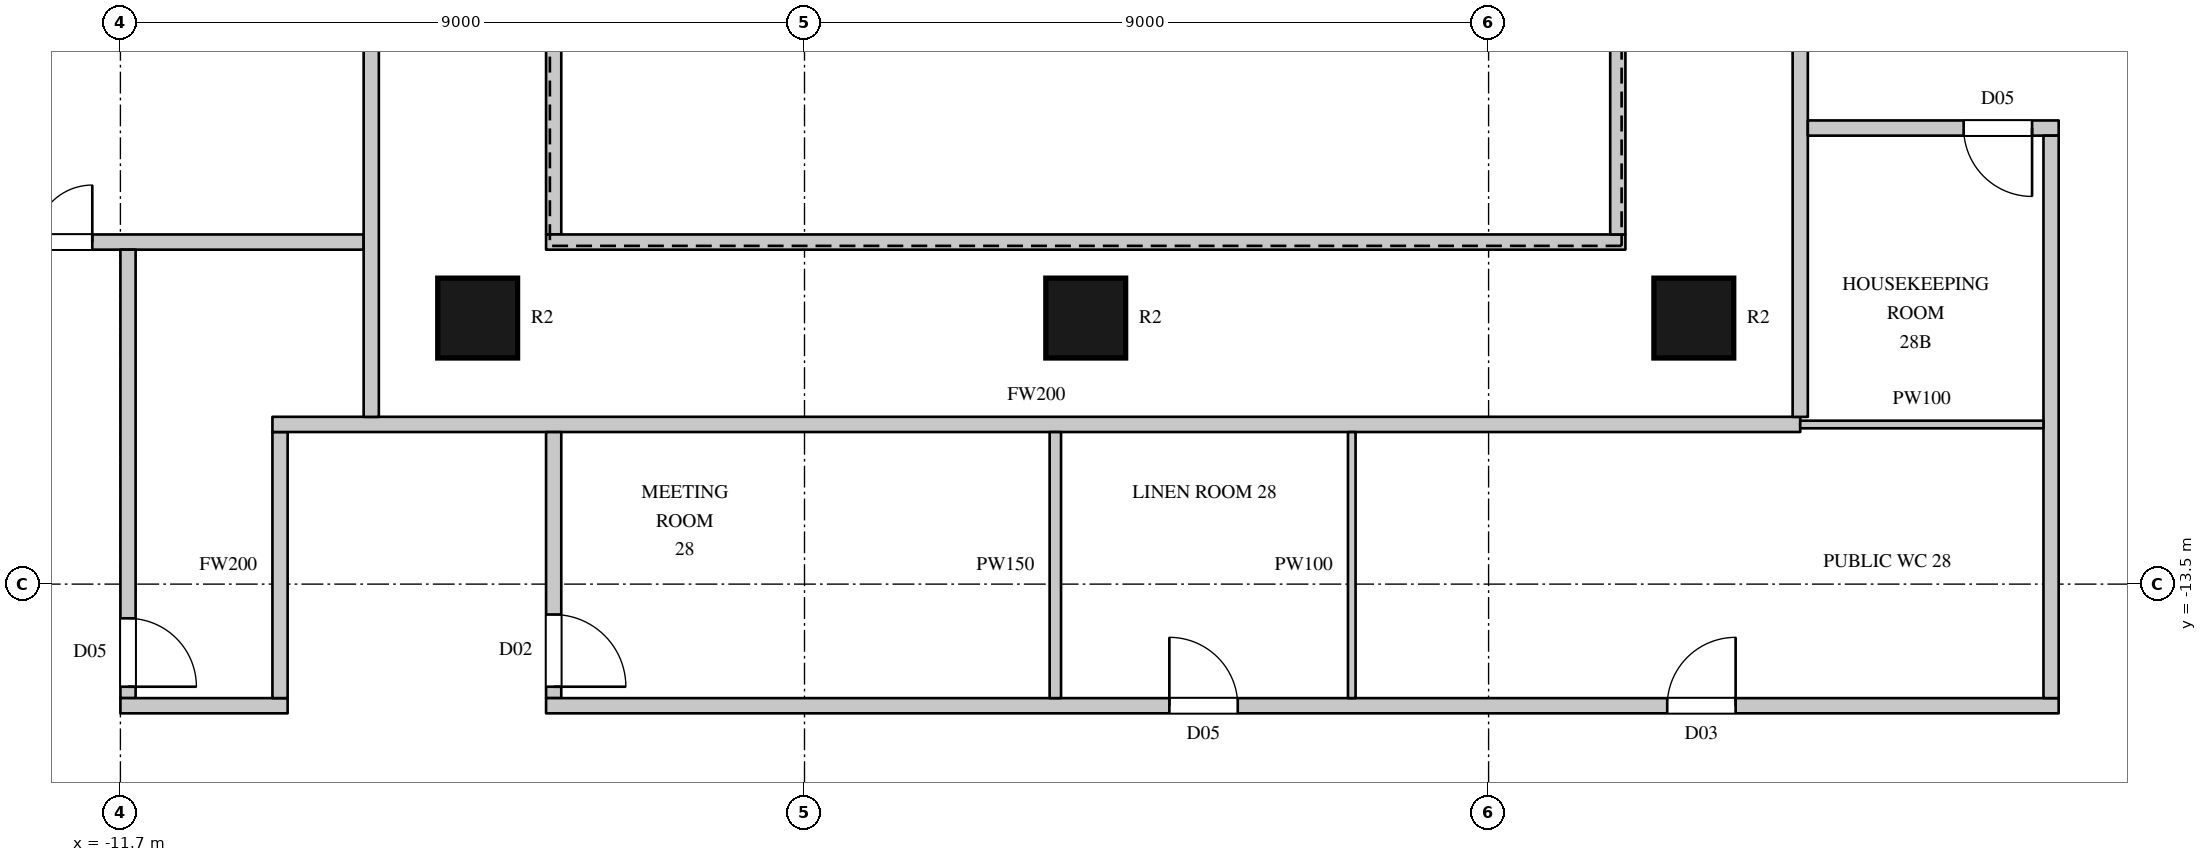
"""IFC4 building model, lengths in metres.
Left out: names, types, materials, properties, quantities, classifications, styles, units other than length and angle.
Written with IfcOpenShell. Run it as: python <this file> out.ifc"""

import sys

from ifc_helpers import new_model, si_unit, direction, frame, frame_2d, origin, origin_2d, place, context, subcontext, project, spatial, rectangle, circle, extrude, element, fill, save


model = new_model("IFC4")
c1 = context("Model", 3, precision=1e-05, world=origin(), true_north=direction((0.0, 1.0)))
c2 = subcontext(c1, "Body", "Model", "MODEL_VIEW")
j1 = project(units=[si_unit("LENGTHUNIT", "METRE"), si_unit("PLANEANGLEUNIT", "RADIAN")], contexts=[c1])
p1 = place(None, origin())
s1 = spatial("IfcSite", under=j1, at=p1, CompositionType="ELEMENT")
p2 = place(p1, origin())
s2 = spatial("IfcBuilding", under=s1, at=p2, CompositionType="ELEMENT")
p3 = place(p2, frame((0.0, 0.0, 131.1)))
s3 = spatial("IfcBuildingStorey", under=s2, at=p3, CompositionType="ELEMENT", Elevation=131.1)
for number, where, z_axis, x_axis in (
    (1, (-7.0, -10.0, 0.0), (0.0, 0.0, 1.0), (1.0, 0.0, 0.0)),
    (2, (1.0, -10.0, 0.0), (0.0, 0.0, 1.0), (1.0, 0.0, 0.0)),
    (3, (9.0, -10.0, 0.0), (0.0, 0.0, 1.0), (1.0, 0.0, 0.0)),
):
    element("IfcColumn", number, at=place(p3, frame(where, z_axis=z_axis, x_axis=x_axis)), inside=s3, PredefinedType="COLUMN", context=c2, shape_type="SweptSolid", body=[
        extrude(circle(Radius=0.525, at=origin_2d()), origin(), (0.0, 0.0, 1.0), 3.6),
    ])
p4 = place(p3, frame((-13.97, -9.0, 0.0), z_axis=(0.0, 0.0, 1.0), x_axis=(1.0, 0.0, 0.0)))
e4 = element("IfcWall", 4, at=p4, inside=s3, PredefinedType="PARTITIONING", context=c2, shape_type="SweptSolid", body=[
    extrude(rectangle(XDim=5.47, YDim=0.2, at=frame_2d((2.735, 0.0))), origin(), (0.0, 0.0, 1.0), 3.3),
])
p5 = place(p4, frame((0.4, 0.0, 0.0)))
e5 = element("IfcOpeningElement", 5, at=p5, cuts=e4, PredefinedType="OPENING", context=c2, shape_type="SweptSolid", body=[
    extrude(rectangle(XDim=1.5, YDim=2.2, at=frame_2d((0.75, 1.1))), frame((0.0, 0.11, 0.0), z_axis=(0.0, -1.0, 0.0), x_axis=(1.0, 0.0, 0.0)), (0.0, 0.0, 1.0), 0.22),
])
p6 = place(p3, frame((-11.6, -15.0, 0.0), z_axis=(0.0, 0.0, 1.0), x_axis=(0.0, 1.0, 0.0)))
e6 = element("IfcWall", 6, at=p6, inside=s3, PredefinedType="PARTITIONING", context=c2, shape_type="SweptSolid", body=[
    extrude(rectangle(XDim=5.9, YDim=0.2, at=frame_2d((2.95, 0.0))), origin(), (0.0, 0.0, 1.0), 2.6),
])
p7 = place(p6, frame((0.15, 0.0, 0.0)))
e7 = element("IfcOpeningElement", 7, at=p7, cuts=e6, PredefinedType="OPENING", context=c2, shape_type="SweptSolid", body=[
    extrude(rectangle(XDim=0.9, YDim=2.2, at=frame_2d((0.45, 1.1))), frame((0.0, 0.11, 0.0), z_axis=(0.0, -1.0, 0.0), x_axis=(1.0, 0.0, 0.0)), (0.0, 0.0, 1.0), 0.22),
])
p8 = place(p3, frame((-11.7, -15.1, 0.0), z_axis=(0.0, 0.0, 1.0), x_axis=(1.0, 0.0, 0.0)))
e8 = element("IfcWall", 8, at=p8, inside=s3, PredefinedType="PARTITIONING", context=c2, shape_type="SweptSolid", body=[
    extrude(rectangle(XDim=2.2, YDim=0.2, at=frame_2d((1.1, 0.0))), origin(), (0.0, 0.0, 1.0), 3.3),
])
p9 = place(p3, frame((-9.6, -15.0, 0.0), z_axis=(0.0, 0.0, 1.0), x_axis=(0.0, 1.0, 0.0)))
e9 = element("IfcWall", 9, at=p9, inside=s3, PredefinedType="PARTITIONING", context=c2, shape_type="SweptSolid", body=[
    extrude(rectangle(XDim=3.501, YDim=0.2, at=frame_2d((1.75, 0.0))), origin(), (0.0, 0.0, 1.0), 3.3),
])
p10 = place(p3, frame((-9.7, -11.399, 0.0), z_axis=(0.0, 0.0, 1.0), x_axis=(1.0, 0.0, 0.0)))
e10 = element("IfcWall", 10, at=p10, inside=s3, PredefinedType="PARTITIONING", context=c2, shape_type="SweptSolid", body=[
    extrude(rectangle(XDim=20.1, YDim=0.2, at=frame_2d((10.05, 0.0))), origin(), (0.0, 0.0, 1.0), 3.3),
])
p11 = place(p3, frame((-8.4, -11.3, 0.0), z_axis=(0.0, 0.0, 1.0), x_axis=(0.0, 1.0, 0.0)))
e11 = element("IfcWall", 11, at=p11, inside=s3, PredefinedType="PARTITIONING", context=c2, shape_type="SweptSolid", body=[
    extrude(rectangle(XDim=22.7, YDim=0.2, at=frame_2d((11.35, 0.0))), origin(), (0.0, 0.0, 1.0), 3.3),
])
p12 = place(p11, frame((15.05, 0.0, 0.0)))
e12 = element("IfcOpeningElement", 12, at=p12, cuts=e11, PredefinedType="OPENING", context=c2, shape_type="SweptSolid", body=[
    extrude(rectangle(XDim=1.5, YDim=2.2, at=frame_2d((0.75, 1.1))), frame((0.0, 0.11, 0.0), z_axis=(0.0, -1.0, 0.0), x_axis=(1.0, 0.0, 0.0)), (0.0, 0.0, 1.0), 0.22),
])
p13 = place(p3, frame((-6.0, -15.0, 0.0), z_axis=(0.0, 0.0, 1.0), x_axis=(0.0, 1.0, 0.0)))
e13 = element("IfcWall", 13, at=p13, inside=s3, PredefinedType="PARTITIONING", context=c2, shape_type="SweptSolid", body=[
    extrude(rectangle(XDim=3.5, YDim=0.2, at=frame_2d((1.75, 0.0))), origin(), (0.0, 0.0, 1.0), 3.3),
])
p14 = place(p13, frame((0.15, 0.0, 0.0)))
e14 = element("IfcOpeningElement", 14, at=p14, cuts=e13, PredefinedType="OPENING", context=c2, shape_type="SweptSolid", body=[
    extrude(rectangle(XDim=0.95, YDim=2.2, at=frame_2d((0.475, 1.1))), frame((0.0, 0.11, 0.0), z_axis=(0.0, -1.0, 0.0), x_axis=(1.0, 0.0, 0.0)), (0.0, 0.0, 1.0), 0.22),
])
p15 = place(p3, frame((-6.1, -15.1, 0.0), z_axis=(0.0, 0.0, 1.0), x_axis=(1.0, 0.0, 0.0)))
e15 = element("IfcWall", 15, at=p15, inside=s3, PredefinedType="PARTITIONING", context=c2, shape_type="SweptSolid", body=[
    extrude(rectangle(XDim=19.9, YDim=0.2, at=frame_2d((9.95, 0.0))), origin(), (0.0, 0.0, 1.0), 3.3),
])
p16 = place(p15, frame((8.2, 0.0, 0.0)))
e16 = element("IfcOpeningElement", 16, at=p16, cuts=e15, PredefinedType="OPENING", context=c2, shape_type="SweptSolid", body=[
    extrude(rectangle(XDim=0.9, YDim=2.2, at=frame_2d((0.45, 1.1))), frame((0.0, 0.11, 0.0), z_axis=(0.0, -1.0, 0.0), x_axis=(1.0, 0.0, 0.0)), (0.0, 0.0, 1.0), 0.22),
])
p17 = place(p15, frame((14.75, 0.0, 0.0)))
e17 = element("IfcOpeningElement", 17, at=p17, cuts=e15, PredefinedType="OPENING", context=c2, shape_type="SweptSolid", body=[
    extrude(rectangle(XDim=0.9, YDim=2.2, at=frame_2d((0.45, 1.1))), frame((0.0, 0.11, 0.0), z_axis=(0.0, -1.0, 0.0), x_axis=(1.0, 0.0, 0.0)), (0.0, 0.0, 1.0), 0.22),
])
p18 = place(p3, frame((-6.0, -8.9, 0.0), z_axis=(0.0, 0.0, 1.0), x_axis=(0.0, 1.0, 0.0)))
e18 = element("IfcWall", 18, at=p18, inside=s3, PredefinedType="PARTITIONING", context=c2, shape_type="SweptSolid", body=[
    extrude(rectangle(XDim=17.8, YDim=0.2, at=frame_2d((8.9, 0.0))), origin(), (0.0, 0.0, 1.0), 3.3),
])
p19 = place(p3, frame((-6.1, -9.0, 0.0), z_axis=(0.0, 0.0, 1.0), x_axis=(1.0, 0.0, 0.0)))
e19 = element("IfcWall", 19, at=p19, inside=s3, PredefinedType="PARTITIONING", context=c2, shape_type="SweptSolid", body=[
    extrude(rectangle(XDim=14.2, YDim=0.2, at=frame_2d((7.1, 0.0))), origin(), (0.0, 0.0, 1.0), 3.3),
])
p20 = place(p3, frame((8.0, -8.9, 0.0), z_axis=(0.0, 0.0, 1.0), x_axis=(0.0, 1.0, 0.0)))
e20 = element("IfcWall", 20, at=p20, inside=s3, PredefinedType="PARTITIONING", context=c2, shape_type="SweptSolid", body=[
    extrude(rectangle(XDim=17.8, YDim=0.2, at=frame_2d((8.9, 0.0))), origin(), (0.0, 0.0, 1.0), 3.3),
])
p21 = place(p3, frame((10.4, -11.3, 0.0), z_axis=(0.0, 0.0, 1.0), x_axis=(0.0, 1.0, 0.0)))
e21 = element("IfcWall", 21, at=p21, inside=s3, PredefinedType="PARTITIONING", context=c2, shape_type="SweptSolid", body=[
    extrude(rectangle(XDim=22.6, YDim=0.2, at=frame_2d((11.3, 0.0))), origin(), (0.0, 0.0, 1.0), 3.3),
])
p22 = place(p21, frame((16.3, 0.0, 0.0)))
e22 = element("IfcOpeningElement", 22, at=p22, cuts=e21, PredefinedType="OPENING", context=c2, shape_type="SweptSolid", body=[
    extrude(rectangle(XDim=1.5, YDim=2.2, at=frame_2d((0.75, 1.1))), frame((0.0, 0.11, 0.0), z_axis=(0.0, -1.0, 0.0), x_axis=(1.0, 0.0, 0.0)), (0.0, 0.0, 1.0), 0.22),
])
p23 = place(p21, frame((9.15, 0.0, 0.0)))
e23 = element("IfcOpeningElement", 23, at=p23, cuts=e21, PredefinedType="OPENING", context=c2, shape_type="SweptSolid", body=[
    extrude(rectangle(XDim=1.5, YDim=2.2, at=frame_2d((0.75, 1.1))), frame((0.0, 0.11, 0.0), z_axis=(0.0, -1.0, 0.0), x_axis=(1.0, 0.0, 0.0)), (0.0, 0.0, 1.0), 0.22),
])
p24 = place(p3, frame((10.5, -7.5, 0.0), z_axis=(0.0, 0.0, 1.0), x_axis=(1.0, 0.0, 0.0)))
e24 = element("IfcWall", 24, at=p24, inside=s3, PredefinedType="PARTITIONING", context=c2, shape_type="SweptSolid", body=[
    extrude(rectangle(XDim=3.3, YDim=0.2, at=frame_2d((1.65, 0.0))), origin(), (0.0, 0.0, 1.0), 3.3),
])
p25 = place(p24, frame((2.05, 0.0, 0.0)))
e25 = element("IfcOpeningElement", 25, at=p25, cuts=e24, PredefinedType="OPENING", context=c2, shape_type="SweptSolid", body=[
    extrude(rectangle(XDim=0.9, YDim=2.2, at=frame_2d((0.45, 1.1))), frame((0.0, 0.11, 0.0), z_axis=(0.0, -1.0, 0.0), x_axis=(1.0, 0.0, 0.0)), (0.0, 0.0, 1.0), 0.22),
])
p26 = place(p3, frame((13.7, -15.0, 0.0), z_axis=(0.0, 0.0, 1.0), x_axis=(0.0, 1.0, 0.0)))
e26 = element("IfcWall", 26, at=p26, inside=s3, PredefinedType="PARTITIONING", context=c2, shape_type="SweptSolid", body=[
    extrude(rectangle(XDim=7.4, YDim=0.2, at=frame_2d((3.7, 0.0))), origin(), (0.0, 0.0, 1.0), 3.3),
])
p27 = place(p3, frame((0.6, -15.0, 0.0), z_axis=(0.0, 0.0, 1.0), x_axis=(0.0, 1.0, 0.0)))
e27 = element("IfcWall", 27, at=p27, inside=s3, PredefinedType="PARTITIONING", context=c2, shape_type="SweptSolid", body=[
    extrude(rectangle(XDim=3.5, YDim=0.15, at=frame_2d((1.75, 0.0))), origin(), (0.0, 0.0, 1.0), 3.3),
])
p28 = place(p3, frame((4.5, -15.0, 0.0), z_axis=(0.0, 0.0, 1.0), x_axis=(0.0, 1.0, 0.0)))
e28 = element("IfcWall", 28, at=p28, inside=s3, PredefinedType="PARTITIONING", context=c2, shape_type="SweptSolid", body=[
    extrude(rectangle(XDim=3.5, YDim=0.1, at=frame_2d((1.75, 0.0))), origin(), (0.0, 0.0, 1.0), 3.3),
])
p29 = place(p3, frame((10.4, -11.4, 0.0), z_axis=(0.0, 0.0, 1.0), x_axis=(1.0, 0.0, 0.0)))
e29 = element("IfcWall", 29, at=p29, inside=s3, PredefinedType="PARTITIONING", context=c2, shape_type="SweptSolid", body=[
    extrude(rectangle(XDim=3.2, YDim=0.1, at=frame_2d((1.6, 0.0))), origin(), (0.0, 0.0, 1.0), 3.3),
])
p30 = place(p5, origin())
e30 = element("IfcDoor", 30, at=p30, inside=s3, OperationType="DOUBLE_DOOR_SINGLE_SWING", PredefinedType="DOOR", context=c2, shape_type="SweptSolid", body=[
    extrude(rectangle(XDim=1.5, YDim=2.2, at=frame_2d((0.75, 1.1))), frame((0.0, 0.025, 0.0), z_axis=(0.0, -1.0, 0.0), x_axis=(1.0, 0.0, 0.0)), (0.0, 0.0, 1.0), 0.05),
])
fill(e5, e30)
p31 = place(p7, origin())
e31 = element("IfcDoor", 31, at=p31, inside=s3, OperationType="SINGLE_SWING_RIGHT", PredefinedType="DOOR", context=c2, shape_type="SweptSolid", body=[
    extrude(rectangle(XDim=0.9, YDim=2.2, at=frame_2d((0.45, 1.1))), frame((0.0, 0.025, 0.0), z_axis=(0.0, -1.0, 0.0), x_axis=(1.0, 0.0, 0.0)), (0.0, 0.0, 1.0), 0.05),
])
fill(e7, e31)
p32 = place(p14, origin())
e32 = element("IfcDoor", 32, at=p32, inside=s3, OperationType="SINGLE_SWING_RIGHT", PredefinedType="DOOR", context=c2, shape_type="SweptSolid", body=[
    extrude(rectangle(XDim=0.95, YDim=2.2, at=frame_2d((0.475, 1.1))), frame((0.0, 0.025, 0.0), z_axis=(0.0, -1.0, 0.0), x_axis=(1.0, 0.0, 0.0)), (0.0, 0.0, 1.0), 0.05),
])
fill(e14, e32)
p33 = place(p16, origin())
e33 = element("IfcDoor", 33, at=p33, inside=s3, OperationType="SINGLE_SWING_LEFT", PredefinedType="DOOR", context=c2, shape_type="SweptSolid", body=[
    extrude(rectangle(XDim=0.9, YDim=2.2, at=frame_2d((0.45, 1.1))), frame((0.0, 0.025, 0.0), z_axis=(0.0, -1.0, 0.0), x_axis=(1.0, 0.0, 0.0)), (0.0, 0.0, 1.0), 0.05),
])
fill(e16, e33)
p34 = place(p17, origin())
e34 = element("IfcDoor", 34, at=p34, inside=s3, OperationType="SINGLE_SWING_RIGHT", PredefinedType="DOOR", context=c2, shape_type="SweptSolid", body=[
    extrude(rectangle(XDim=0.9, YDim=2.2, at=frame_2d((0.45, 1.1))), frame((0.0, 0.025, 0.0), z_axis=(0.0, -1.0, 0.0), x_axis=(1.0, 0.0, 0.0)), (0.0, 0.0, 1.0), 0.05),
])
fill(e17, e34)
p35 = place(p25, origin())
e35 = element("IfcDoor", 35, at=p35, inside=s3, OperationType="SINGLE_SWING_LEFT", PredefinedType="DOOR", context=c2, shape_type="SweptSolid", body=[
    extrude(rectangle(XDim=0.9, YDim=2.2, at=frame_2d((0.45, 1.1))), frame((0.0, 0.025, 0.0), z_axis=(0.0, -1.0, 0.0), x_axis=(1.0, 0.0, 0.0)), (0.0, 0.0, 1.0), 0.05),
])
fill(e25, e35)
save(model, sys.argv[1])
